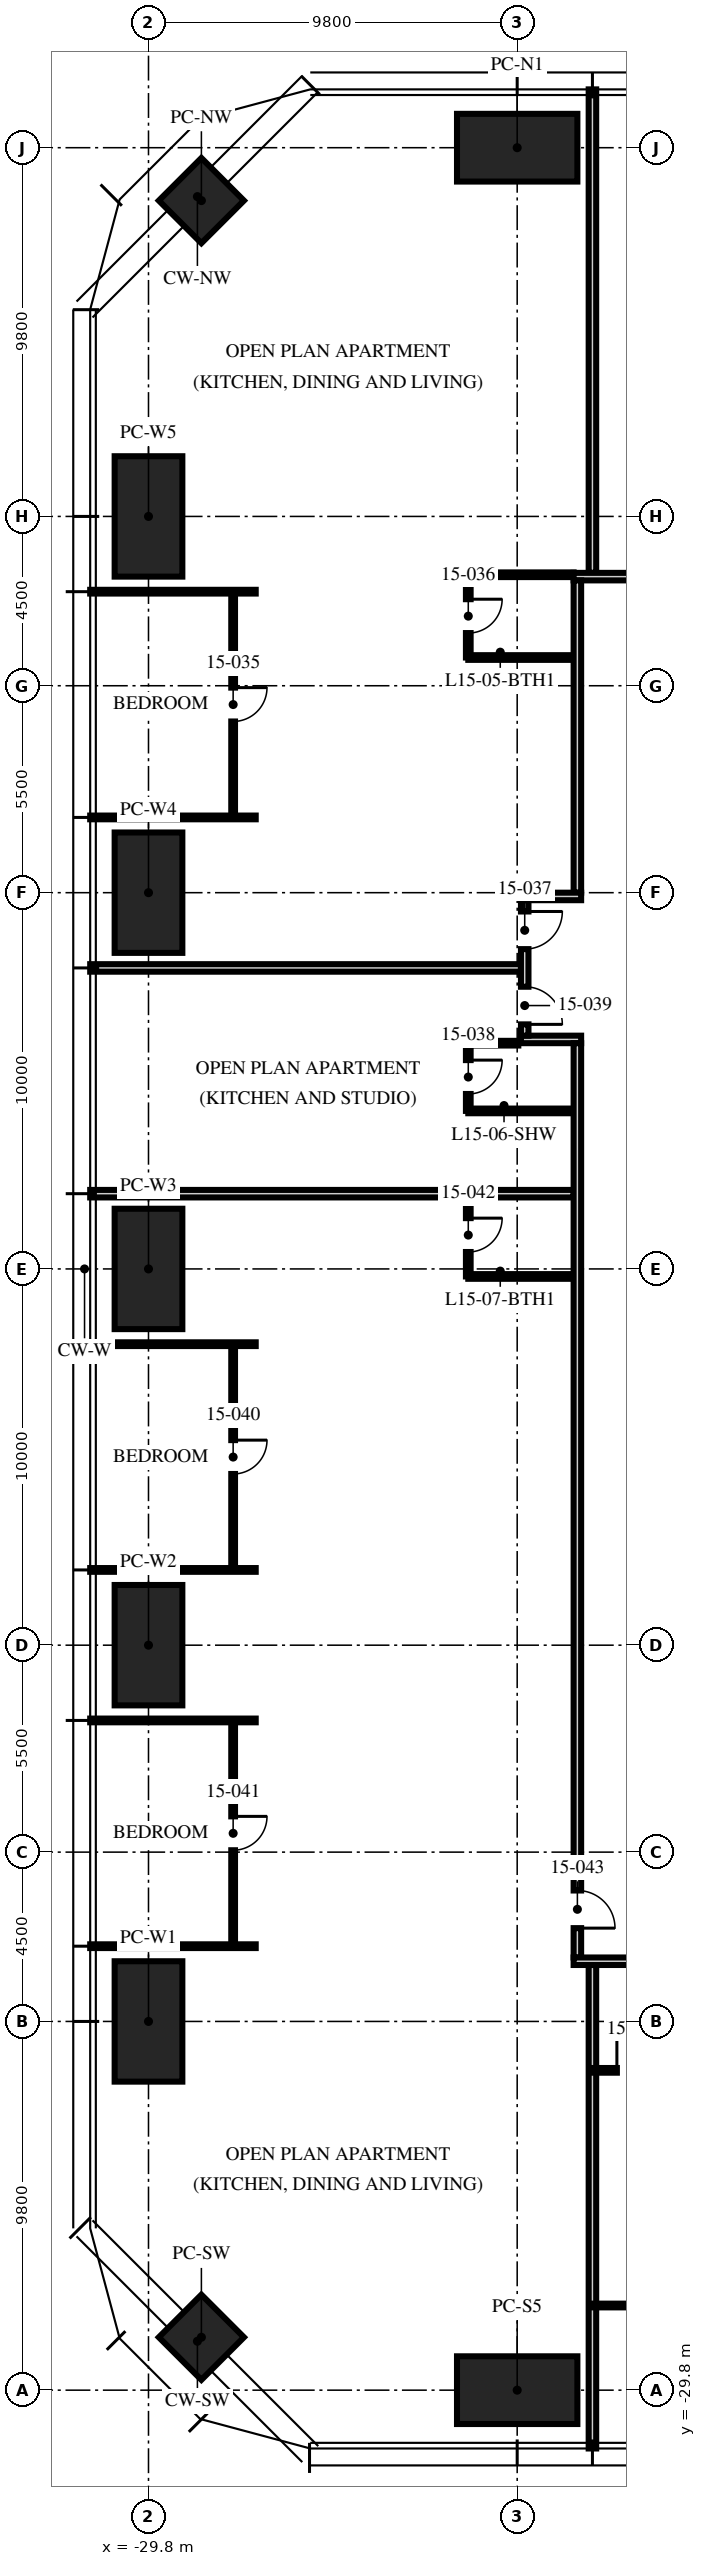
"""IFC4 building model, lengths in metres.
Left out: names, types, materials, properties, quantities, classifications, styles, units other than length and angle.
Written with IfcOpenShell. Run it as: python <this file> out.ifc"""

import sys

from ifc_helpers import new_model, si_unit, direction, frame, frame_2d, origin, origin_2d, place, context, subcontext, project, spatial, rectangle, hollow_rectangle, extrude, element, fill, save


model = new_model("IFC4")
c1 = context("Model", 3, precision=1e-05, world=origin(), true_north=direction((0.0, 1.0)))
c2 = subcontext(c1, "Body", "Model", "MODEL_VIEW")
j1 = project(units=[si_unit("LENGTHUNIT", "METRE"), si_unit("PLANEANGLEUNIT", "RADIAN")], contexts=[c1])
p1 = place(None, origin())
s1 = spatial("IfcSite", under=j1, at=p1, CompositionType="ELEMENT")
p2 = place(p1, origin())
s2 = spatial("IfcBuilding", under=s1, at=p2, CompositionType="ELEMENT")
p3 = place(p2, frame((0.0, 0.0, 62.25)))
s3 = spatial("IfcBuildingStorey", under=s2, at=p3, CompositionType="ELEMENT", Elevation=62.25)
for number, where, z_axis, x_axis in (
    (1, (-20.0, 29.8, 0.0), (0.0, 0.0, 1.0), (1.0, 0.0, 0.0)),
    (2, (-20.0, -29.8, 0.0), (0.0, 0.0, 1.0), (1.0, 0.0, 0.0)),
    (3, (-29.8, -20.0, 0.0), (0.0, 0.0, 1.0), (0.0, 1.0, 0.0)),
    (4, (-29.8, -10.0, 0.0), (0.0, 0.0, 1.0), (0.0, 1.0, 0.0)),
    (5, (-29.8, 0.0, 0.0), (0.0, 0.0, 1.0), (0.0, 1.0, 0.0)),
    (6, (-29.8, 10.0, 0.0), (0.0, 0.0, 1.0), (0.0, 1.0, 0.0)),
    (7, (-29.8, 20.0, 0.0), (0.0, 0.0, 1.0), (0.0, 1.0, 0.0)),
):
    element("IfcColumn", number, at=place(p3, frame(where, z_axis=z_axis, x_axis=x_axis)), inside=s3, PredefinedType="COLUMN", context=c2, shape_type="SweptSolid", body=[
        extrude(hollow_rectangle(XDim=3.2, YDim=1.8, WallThickness=0.2, at=origin_2d()), origin(), (0.0, 0.0, 1.0), 3.75),
    ])
for number, where, z_axis, x_axis in (
    (8, (-28.394, -28.394, 0.0), (0.0, 0.0, 1.0), (0.707, -0.707, 0.0)),
    (9, (-28.394, 28.394, 0.0), (0.0, 0.0, 1.0), (0.707, 0.707, 0.0)),
):
    element("IfcColumn", number, at=place(p3, frame(where, z_axis=z_axis, x_axis=x_axis)), inside=s3, PredefinedType="COLUMN", context=c2, shape_type="SweptSolid", body=[
        extrude(hollow_rectangle(XDim=1.6, YDim=1.6, WallThickness=0.1, at=origin_2d()), origin(), (0.0, 0.0, 1.0), 3.75),
    ])
p4 = place(p3, frame((-18.0, 18.5, 0.0), z_axis=(0.0, 0.0, 1.0), x_axis=(0.0, 1.0, 0.0)))
e10 = element("IfcWall", 10, at=p4, inside=s3, PredefinedType="PARTITIONING", context=c2, shape_type="SweptSolid", body=[
    extrude(rectangle(XDim=12.85, YDim=0.2, at=frame_2d((6.425, 0.0))), origin(), (0.0, 0.0, 1.0), 2.3),
])
for number, where, z_axis, x_axis in (
    (11, (-26.95, 18.0, 0.0), (0.0, 0.0, 1.0), (-1.0, 0.0, 0.0)),
    (12, (-26.95, 12.0, 0.0), (0.0, 0.0, 1.0), (-1.0, 0.0, 0.0)),
):
    element("IfcWall", number, at=place(p3, frame(where, z_axis=z_axis, x_axis=x_axis)), inside=s3, PredefinedType="PARTITIONING", context=c2, shape_type="SweptSolid", body=[
        extrude(rectangle(XDim=4.4, YDim=0.1, at=frame_2d((2.2, 0.0))), origin(), (0.0, 0.0, 1.0), 2.71),
    ])
p5 = place(p3, frame((-19.9, 8.0, 0.0), z_axis=(0.0, 0.0, 1.0), x_axis=(-1.0, 0.0, 0.0)))
e13 = element("IfcWall", 13, at=p5, inside=s3, PredefinedType="PARTITIONING", context=c2, shape_type="SweptSolid", body=[
    extrude(rectangle(XDim=11.45, YDim=0.2, at=frame_2d((5.725, 0.0))), origin(), (0.0, 0.0, 1.0), 2.71),
])
p6 = place(p3, frame((-18.5, 2.0, 0.0), z_axis=(0.0, 0.0, 1.0), x_axis=(-1.0, 0.0, 0.0)))
e14 = element("IfcWall", 14, at=p6, inside=s3, PredefinedType="PARTITIONING", context=c2, shape_type="SweptSolid", body=[
    extrude(rectangle(XDim=12.85, YDim=0.2, at=frame_2d((6.425, 0.0))), origin(), (0.0, 0.0, 1.0), 2.71),
])
for number, where, z_axis, x_axis in (
    (15, (-26.95, -2.0, 0.0), (0.0, 0.0, 1.0), (-1.0, 0.0, 0.0)),
    (16, (-26.95, -8.0, 0.0), (0.0, 0.0, 1.0), (-1.0, 0.0, 0.0)),
    (17, (-26.95, -12.0, 0.0), (0.0, 0.0, 1.0), (-1.0, 0.0, 0.0)),
    (18, (-26.95, -18.0, 0.0), (0.0, 0.0, 1.0), (-1.0, 0.0, 0.0)),
):
    element("IfcWall", number, at=place(p3, frame(where, z_axis=z_axis, x_axis=x_axis)), inside=s3, PredefinedType="PARTITIONING", context=c2, shape_type="SweptSolid", body=[
        extrude(rectangle(XDim=4.4, YDim=0.1, at=frame_2d((2.2, 0.0))), origin(), (0.0, 0.0, 1.0), 2.71),
    ])
p7 = place(p3, frame((-18.0, -18.5, 0.0), z_axis=(0.0, 0.0, 1.0), x_axis=(0.0, -1.0, 0.0)))
e19 = element("IfcWall", 19, at=p7, inside=s3, PredefinedType="PARTITIONING", context=c2, shape_type="SweptSolid", body=[
    extrude(rectangle(XDim=12.85, YDim=0.2, at=frame_2d((6.425, 0.0))), origin(), (0.0, 0.0, 1.0), 2.3),
])
p8 = place(p3, frame((-27.55, 18.0, 0.0), z_axis=(0.0, 0.0, 1.0), x_axis=(0.0, -1.0, 0.0)))
e20 = element("IfcWall", 20, at=p8, inside=s3, PredefinedType="PARTITIONING", context=c2, shape_type="SweptSolid", body=[
    extrude(rectangle(XDim=6.0, YDim=0.1, at=frame_2d((3.0, 0.0))), origin(), (0.0, 0.0, 1.0), 2.61),
])
p9 = place(p8, frame((2.55, 0.0, 0.0)))
e21 = element("IfcOpeningElement", 21, at=p9, cuts=e20, PredefinedType="OPENING", context=c2, shape_type="SweptSolid", body=[
    extrude(rectangle(XDim=0.9, YDim=2.1, at=frame_2d((0.45, 1.05))), frame((0.0, 0.06, 0.0), z_axis=(0.0, -1.0, 0.0), x_axis=(1.0, 0.0, 0.0)), (0.0, 0.0, 1.0), 0.12),
])
p10 = place(p3, frame((-21.3, 18.45, 0.0), z_axis=(0.0, 0.0, 1.0), x_axis=(0.0, -1.0, 0.0)))
e22 = element("IfcWall", 22, at=p10, inside=s3, PredefinedType="PARTITIONING", context=c2, shape_type="SweptSolid", body=[
    extrude(rectangle(XDim=2.2, YDim=0.125, at=frame_2d((1.1, 0.0))), origin(), (0.0, 0.0, 1.0), 3.5),
])
p11 = place(p10, frame((0.65, 0.0, 0.0)))
e23 = element("IfcOpeningElement", 23, at=p11, cuts=e22, PredefinedType="OPENING", context=c2, shape_type="SweptSolid", body=[
    extrude(rectangle(XDim=0.9, YDim=2.1, at=frame_2d((0.45, 1.05))), frame((0.0, 0.073, 0.0), z_axis=(0.0, -1.0, 0.0), x_axis=(1.0, 0.0, 0.0)), (0.0, 0.0, 1.0), 0.145),
])
p12 = place(p3, frame((-18.5, 18.45, 0.0), z_axis=(0.0, 0.0, 1.0), x_axis=(-1.0, 0.0, 0.0)))
e24 = element("IfcWall", 24, at=p12, inside=s3, PredefinedType="PARTITIONING", context=c2, shape_type="SweptSolid", body=[
    extrude(rectangle(XDim=2.8, YDim=0.125, at=frame_2d((1.4, 0.0))), origin(), (0.0, 0.0, 1.0), 2.3),
])
p13 = place(p3, frame((-18.5, 16.25, 0.0), z_axis=(0.0, 0.0, 1.0), x_axis=(-1.0, 0.0, 0.0)))
e25 = element("IfcWall", 25, at=p13, inside=s3, PredefinedType="PARTITIONING", context=c2, shape_type="SweptSolid", body=[
    extrude(rectangle(XDim=2.8, YDim=0.125, at=frame_2d((1.4, 0.0))), origin(), (0.0, 0.0, 1.0), 3.5),
])
p14 = place(p3, frame((-21.3, 6.0, 0.0), z_axis=(0.0, 0.0, 1.0), x_axis=(0.0, -1.0, 0.0)))
e26 = element("IfcWall", 26, at=p14, inside=s3, PredefinedType="PARTITIONING", context=c2, shape_type="SweptSolid", body=[
    extrude(rectangle(XDim=1.8, YDim=0.125, at=frame_2d((0.9, 0.0))), origin(), (0.0, 0.0, 1.0), 2.61),
])
p15 = place(p14, frame((0.45, 0.0, 0.0)))
e27 = element("IfcOpeningElement", 27, at=p15, cuts=e26, PredefinedType="OPENING", context=c2, shape_type="SweptSolid", body=[
    extrude(rectangle(XDim=0.9, YDim=2.1, at=frame_2d((0.45, 1.05))), frame((0.0, 0.073, 0.0), z_axis=(0.0, -1.0, 0.0), x_axis=(1.0, 0.0, 0.0)), (0.0, 0.0, 1.0), 0.145),
])
p16 = place(p3, frame((-19.97, 6.0, 0.0), z_axis=(0.0, 0.0, 1.0), x_axis=(-1.0, 0.0, 0.0)))
e28 = element("IfcWall", 28, at=p16, inside=s3, PredefinedType="PARTITIONING", context=c2, shape_type="SweptSolid", body=[
    extrude(rectangle(XDim=1.33, YDim=0.125, at=frame_2d((0.665, 0.0))), origin(), (0.0, 0.0, 1.0), 3.5),
])
p17 = place(p3, frame((-18.5, 4.2, 0.0), z_axis=(0.0, 0.0, 1.0), x_axis=(-1.0, 0.0, 0.0)))
e29 = element("IfcWall", 29, at=p17, inside=s3, PredefinedType="PARTITIONING", context=c2, shape_type="SweptSolid", body=[
    extrude(rectangle(XDim=2.8, YDim=0.125, at=frame_2d((1.4, 0.0))), origin(), (0.0, 0.0, 1.0), 3.5),
])
p18 = place(p3, frame((-27.55, -2.0, 0.0), z_axis=(0.0, 0.0, 1.0), x_axis=(0.0, -1.0, 0.0)))
e30 = element("IfcWall", 30, at=p18, inside=s3, PredefinedType="PARTITIONING", context=c2, shape_type="SweptSolid", body=[
    extrude(rectangle(XDim=6.0, YDim=0.1, at=frame_2d((3.0, 0.0))), origin(), (0.0, 0.0, 1.0), 2.61),
])
p19 = place(p18, frame((2.55, 0.0, 0.0)))
e31 = element("IfcOpeningElement", 31, at=p19, cuts=e30, PredefinedType="OPENING", context=c2, shape_type="SweptSolid", body=[
    extrude(rectangle(XDim=0.9, YDim=2.1, at=frame_2d((0.45, 1.05))), frame((0.0, 0.06, 0.0), z_axis=(0.0, -1.0, 0.0), x_axis=(1.0, 0.0, 0.0)), (0.0, 0.0, 1.0), 0.12),
])
p20 = place(p3, frame((-27.55, -12.0, 0.0), z_axis=(0.0, 0.0, 1.0), x_axis=(0.0, -1.0, 0.0)))
e32 = element("IfcWall", 32, at=p20, inside=s3, PredefinedType="PARTITIONING", context=c2, shape_type="SweptSolid", body=[
    extrude(rectangle(XDim=6.0, YDim=0.1, at=frame_2d((3.0, 0.0))), origin(), (0.0, 0.0, 1.0), 2.61),
])
p21 = place(p20, frame((2.55, 0.0, 0.0)))
e33 = element("IfcOpeningElement", 33, at=p21, cuts=e32, PredefinedType="OPENING", context=c2, shape_type="SweptSolid", body=[
    extrude(rectangle(XDim=0.9, YDim=2.1, at=frame_2d((0.45, 1.05))), frame((0.0, 0.06, 0.0), z_axis=(0.0, -1.0, 0.0), x_axis=(1.0, 0.0, 0.0)), (0.0, 0.0, 1.0), 0.12),
])
p22 = place(p3, frame((-21.3, 2.0, 0.0), z_axis=(0.0, 0.0, 1.0), x_axis=(0.0, -1.0, 0.0)))
e34 = element("IfcWall", 34, at=p22, inside=s3, PredefinedType="PARTITIONING", context=c2, shape_type="SweptSolid", body=[
    extrude(rectangle(XDim=2.2, YDim=0.125, at=frame_2d((1.1, 0.0))), origin(), (0.0, 0.0, 1.0), 2.492),
])
p23 = place(p22, frame((0.65, 0.0, 0.0)))
e35 = element("IfcOpeningElement", 35, at=p23, cuts=e34, PredefinedType="OPENING", context=c2, shape_type="SweptSolid", body=[
    extrude(rectangle(XDim=0.9, YDim=2.1, at=frame_2d((0.45, 1.05))), frame((0.0, 0.073, 0.0), z_axis=(0.0, -1.0, 0.0), x_axis=(1.0, 0.0, 0.0)), (0.0, 0.0, 1.0), 0.145),
])
p24 = place(p3, frame((-18.5, -0.2, 0.0), z_axis=(0.0, 0.0, 1.0), x_axis=(-1.0, 0.0, 0.0)))
e36 = element("IfcWall", 36, at=p24, inside=s3, PredefinedType="PARTITIONING", context=c2, shape_type="SweptSolid", body=[
    extrude(rectangle(XDim=2.8, YDim=0.125, at=frame_2d((1.4, 0.0))), origin(), (0.0, 0.0, 1.0), 2.492),
])
p25 = place(p3, frame((-18.0, -27.55, 0.0), z_axis=(0.0, 0.0, 1.0), x_axis=(1.0, 0.0, 0.0)))
e37 = element("IfcWall", 37, at=p25, inside=s3, PredefinedType="PARTITIONING", context=c2, shape_type="SweptSolid", body=[
    extrude(rectangle(XDim=6.0, YDim=0.1, at=frame_2d((3.0, 0.0))), origin(), (0.0, 0.0, 1.0), 2.61),
])
p26 = place(p25, frame((2.55, 0.0, 0.0)))
e38 = element("IfcOpeningElement", 38, at=p26, cuts=e37, PredefinedType="OPENING", context=c2, shape_type="SweptSolid", body=[
    extrude(rectangle(XDim=0.9, YDim=2.1, at=frame_2d((0.45, 1.05))), frame((0.0, 0.06, 0.0), z_axis=(0.0, -1.0, 0.0), x_axis=(1.0, 0.0, 0.0)), (0.0, 0.0, 1.0), 0.12),
])
p27 = place(p3, frame((-18.0, -21.3, 0.0), z_axis=(0.0, 0.0, 1.0), x_axis=(1.0, 0.0, 0.0)))
e39 = element("IfcWall", 39, at=p27, inside=s3, PredefinedType="PARTITIONING", context=c2, shape_type="SweptSolid", body=[
    extrude(rectangle(XDim=2.2, YDim=0.125, at=frame_2d((1.1, 0.0))), origin(), (0.0, 0.0, 1.0), 3.5),
])
p28 = place(p27, frame((0.65, 0.0, 0.0)))
e40 = element("IfcOpeningElement", 40, at=p28, cuts=e39, PredefinedType="OPENING", context=c2, shape_type="SweptSolid", body=[
    extrude(rectangle(XDim=0.9, YDim=2.1, at=frame_2d((0.45, 1.05))), frame((0.0, 0.073, 0.0), z_axis=(0.0, -1.0, 0.0), x_axis=(1.0, 0.0, 0.0)), (0.0, 0.0, 1.0), 0.145),
])
p29 = place(p3, frame((-18.5, 18.4, 0.0), z_axis=(0.0, 0.0, 1.0), x_axis=(1.0, 0.0, 0.0)))
e41 = element("IfcWall", 41, at=p29, inside=s3, PredefinedType="PARTITIONING", context=c2, shape_type="SweptSolid", body=[
    extrude(rectangle(XDim=24.5, YDim=0.2, at=frame_2d((12.25, 0.0))), origin(), (0.0, 0.0, 1.0), 2.3),
])
p30 = place(p3, frame((-18.4, 18.3, 0.0), z_axis=(0.0, 0.0, 1.0), x_axis=(0.0, -1.0, 0.0)))
e42 = element("IfcWall", 42, at=p30, inside=s3, PredefinedType="PARTITIONING", context=c2, shape_type="SweptSolid", body=[
    extrude(rectangle(XDim=8.3, YDim=0.2, at=frame_2d((4.15, 0.0))), origin(), (0.0, 0.0, 1.0), 2.3),
])
p31 = place(p3, frame((-18.3, 9.9, 0.0), z_axis=(0.0, 0.0, 1.0), x_axis=(-1.0, 0.0, 0.0)))
e43 = element("IfcWall", 43, at=p31, inside=s3, PredefinedType="PARTITIONING", context=c2, shape_type="SweptSolid", body=[
    extrude(rectangle(XDim=1.6, YDim=0.2, at=frame_2d((0.8, 0.0))), origin(), (0.0, 0.0, 1.0), 2.492),
])
p32 = place(p3, frame((-18.3, 6.1, 0.0), z_axis=(0.0, 0.0, 1.0), x_axis=(-1.0, 0.0, 0.0)))
e44 = element("IfcWall", 44, at=p32, inside=s3, PredefinedType="PARTITIONING", context=c2, shape_type="SweptSolid", body=[
    extrude(rectangle(XDim=1.6, YDim=0.2, at=frame_2d((0.8, 0.0))), origin(), (0.0, 0.0, 1.0), 3.5),
])
p33 = place(p3, frame((-19.8, 9.8, 0.0), z_axis=(0.0, 0.0, 1.0), x_axis=(0.0, -1.0, 0.0)))
e45 = element("IfcWall", 45, at=p33, inside=s3, PredefinedType="PARTITIONING", context=c2, shape_type="SweptSolid", body=[
    extrude(rectangle(XDim=3.6, YDim=0.2, at=frame_2d((1.8, 0.0))), origin(), (0.0, 0.0, 1.0), 3.5),
])
p34 = place(p33, frame((0.3, 0.0, 0.0)))
e46 = element("IfcOpeningElement", 46, at=p34, cuts=e45, PredefinedType="OPENING", context=c2, shape_type="SweptSolid", body=[
    extrude(rectangle(XDim=1.0, YDim=2.2, at=frame_2d((0.5, 1.1))), frame((0.0, 0.11, 0.0), z_axis=(0.0, -1.0, 0.0), x_axis=(1.0, 0.0, 0.0)), (0.0, 0.0, 1.0), 0.22),
])
p35 = place(p33, frame((2.3, 0.0, 0.0)))
e47 = element("IfcOpeningElement", 47, at=p35, cuts=e45, PredefinedType="OPENING", context=c2, shape_type="SweptSolid", body=[
    extrude(rectangle(XDim=1.0, YDim=2.2, at=frame_2d((0.5, 1.1))), frame((0.0, 0.11, 0.0), z_axis=(0.0, -1.0, 0.0), x_axis=(1.0, 0.0, 0.0)), (0.0, 0.0, 1.0), 0.22),
])
p36 = place(p3, frame((-18.4, 6.0, 0.0), z_axis=(0.0, 0.0, 1.0), x_axis=(0.0, -1.0, 0.0)))
e48 = element("IfcWall", 48, at=p36, inside=s3, PredefinedType="PARTITIONING", context=c2, shape_type="SweptSolid", body=[
    extrude(rectangle(XDim=24.3, YDim=0.2, at=frame_2d((12.15, 0.0))), origin(), (0.0, 0.0, 1.0), 2.3),
])
p37 = place(p36, frame((22.52, 0.0, 0.0)))
e49 = element("IfcOpeningElement", 49, at=p37, cuts=e48, PredefinedType="OPENING", context=c2, shape_type="SweptSolid", body=[
    extrude(rectangle(XDim=1.0, YDim=2.2, at=frame_2d((0.5, 1.1))), frame((0.0, 0.11, 0.0), z_axis=(0.0, -1.0, 0.0), x_axis=(1.0, 0.0, 0.0)), (0.0, 0.0, 1.0), 0.22),
])
p38 = place(p3, frame((18.5, -18.4, 0.0), z_axis=(0.0, 0.0, 1.0), x_axis=(-1.0, 0.0, 0.0)))
e50 = element("IfcWall", 50, at=p38, inside=s3, PredefinedType="PARTITIONING", context=c2, shape_type="SweptSolid", body=[
    extrude(rectangle(XDim=37.0, YDim=0.2, at=frame_2d((18.5, 0.0))), origin(), (0.0, 0.0, 1.0), 2.3),
])
p39 = place(p38, frame((27.23, 0.0, 0.0)))
e51 = element("IfcOpeningElement", 51, at=p39, cuts=e50, PredefinedType="OPENING", context=c2, shape_type="SweptSolid", body=[
    extrude(rectangle(XDim=1.0, YDim=2.2, at=frame_2d((0.5, 1.1))), frame((0.0, 0.11, 0.0), z_axis=(0.0, -1.0, 0.0), x_axis=(1.0, 0.0, 0.0)), (0.0, 0.0, 1.0), 0.22),
])
p40 = place(p38, frame((20.93, 0.0, 0.0)))
e52 = element("IfcOpeningElement", 52, at=p40, cuts=e50, PredefinedType="OPENING", context=c2, shape_type="SweptSolid", body=[
    extrude(rectangle(XDim=1.0, YDim=2.2, at=frame_2d((0.5, 1.1))), frame((0.0, 0.11, 0.0), z_axis=(0.0, -1.0, 0.0), x_axis=(1.0, 0.0, 0.0)), (0.0, 0.0, 1.0), 0.22),
])
p41 = place(p38, frame((11.23, 0.0, 0.0)))
e53 = element("IfcOpeningElement", 53, at=p41, cuts=e50, PredefinedType="OPENING", context=c2, shape_type="SweptSolid", body=[
    extrude(rectangle(XDim=1.0, YDim=2.2, at=frame_2d((0.5, 1.1))), frame((0.0, 0.11, 0.0), z_axis=(0.0, -1.0, 0.0), x_axis=(1.0, 0.0, 0.0)), (0.0, 0.0, 1.0), 0.22),
])
p42 = place(p9, origin())
e54 = element("IfcDoor", 54, at=p42, inside=s3, OperationType="SINGLE_SWING_LEFT", PredefinedType="DOOR", context=c2, shape_type="SweptSolid", body=[
    extrude(rectangle(XDim=0.9, YDim=2.1, at=frame_2d((0.45, 1.05))), frame((0.0, 0.025, 0.0), z_axis=(0.0, -1.0, 0.0), x_axis=(1.0, 0.0, 0.0)), (0.0, 0.0, 1.0), 0.05),
])
fill(e21, e54)
p43 = place(p11, origin())
e55 = element("IfcDoor", 55, at=p43, inside=s3, OperationType="SINGLE_SWING_LEFT", PredefinedType="DOOR", context=c2, shape_type="SweptSolid", body=[
    extrude(rectangle(XDim=0.9, YDim=2.1, at=frame_2d((0.45, 1.05))), frame((0.0, 0.025, 0.0), z_axis=(0.0, -1.0, 0.0), x_axis=(1.0, 0.0, 0.0)), (0.0, 0.0, 1.0), 0.05),
])
fill(e23, e55)
p44 = place(p34, origin())
e56 = element("IfcDoor", 56, at=p44, inside=s3, OperationType="SINGLE_SWING_LEFT", PredefinedType="DOOR", context=c2, shape_type="SweptSolid", body=[
    extrude(rectangle(XDim=1.0, YDim=2.2, at=frame_2d((0.5, 1.1))), frame((0.0, 0.025, 0.0), z_axis=(0.0, -1.0, 0.0), x_axis=(1.0, 0.0, 0.0)), (0.0, 0.0, 1.0), 0.05),
])
fill(e46, e56)
p45 = place(p15, origin())
e57 = element("IfcDoor", 57, at=p45, inside=s3, OperationType="SINGLE_SWING_LEFT", PredefinedType="DOOR", context=c2, shape_type="SweptSolid", body=[
    extrude(rectangle(XDim=0.9, YDim=2.1, at=frame_2d((0.45, 1.05))), frame((0.0, 0.025, 0.0), z_axis=(0.0, -1.0, 0.0), x_axis=(1.0, 0.0, 0.0)), (0.0, 0.0, 1.0), 0.05),
])
fill(e27, e57)
p46 = place(p35, origin())
e58 = element("IfcDoor", 58, at=p46, inside=s3, OperationType="SINGLE_SWING_RIGHT", PredefinedType="DOOR", context=c2, shape_type="SweptSolid", body=[
    extrude(rectangle(XDim=1.0, YDim=2.2, at=frame_2d((0.5, 1.1))), frame((0.0, 0.025, 0.0), z_axis=(0.0, -1.0, 0.0), x_axis=(1.0, 0.0, 0.0)), (0.0, 0.0, 1.0), 0.05),
])
fill(e47, e58)
p47 = place(p19, origin())
e59 = element("IfcDoor", 59, at=p47, inside=s3, OperationType="SINGLE_SWING_LEFT", PredefinedType="DOOR", context=c2, shape_type="SweptSolid", body=[
    extrude(rectangle(XDim=0.9, YDim=2.1, at=frame_2d((0.45, 1.05))), frame((0.0, 0.025, 0.0), z_axis=(0.0, -1.0, 0.0), x_axis=(1.0, 0.0, 0.0)), (0.0, 0.0, 1.0), 0.05),
])
fill(e31, e59)
p48 = place(p21, origin())
e60 = element("IfcDoor", 60, at=p48, inside=s3, OperationType="SINGLE_SWING_LEFT", PredefinedType="DOOR", context=c2, shape_type="SweptSolid", body=[
    extrude(rectangle(XDim=0.9, YDim=2.1, at=frame_2d((0.45, 1.05))), frame((0.0, 0.025, 0.0), z_axis=(0.0, -1.0, 0.0), x_axis=(1.0, 0.0, 0.0)), (0.0, 0.0, 1.0), 0.05),
])
fill(e33, e60)
p49 = place(p23, origin())
e61 = element("IfcDoor", 61, at=p49, inside=s3, OperationType="SINGLE_SWING_LEFT", PredefinedType="DOOR", context=c2, shape_type="SweptSolid", body=[
    extrude(rectangle(XDim=0.9, YDim=2.1, at=frame_2d((0.45, 1.05))), frame((0.0, 0.025, 0.0), z_axis=(0.0, -1.0, 0.0), x_axis=(1.0, 0.0, 0.0)), (0.0, 0.0, 1.0), 0.05),
])
fill(e35, e61)
p50 = place(p37, origin())
e62 = element("IfcDoor", 62, at=p50, inside=s3, OperationType="SINGLE_SWING_RIGHT", PredefinedType="DOOR", context=c2, shape_type="SweptSolid", body=[
    extrude(rectangle(XDim=1.0, YDim=2.2, at=frame_2d((0.5, 1.1))), frame((0.0, 0.025, 0.0), z_axis=(0.0, -1.0, 0.0), x_axis=(1.0, 0.0, 0.0)), (0.0, 0.0, 1.0), 0.05),
])
fill(e49, e62)
p51 = place(p28, origin())
e63 = element("IfcDoor", 63, at=p51, inside=s3, OperationType="SINGLE_SWING_LEFT", PredefinedType="DOOR", context=c2, shape_type="SweptSolid", body=[
    extrude(rectangle(XDim=0.9, YDim=2.1, at=frame_2d((0.45, 1.05))), frame((0.0, 0.025, 0.0), z_axis=(0.0, -1.0, 0.0), x_axis=(1.0, 0.0, 0.0)), (0.0, 0.0, 1.0), 0.05),
])
fill(e40, e63)
save(model, sys.argv[1])
